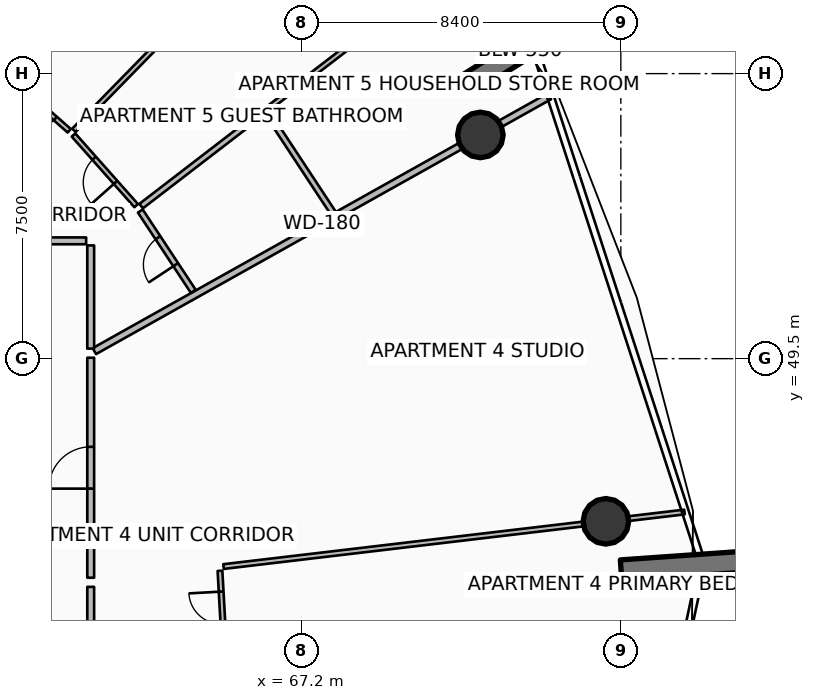
"""IFC4 building model, lengths in metres.
Left out: names, types, materials, properties, quantities, classifications, styles, units other than length and angle.
Written with IfcOpenShell. Run it as: python <this file> out.ifc"""

import sys

from ifc_helpers import new_model, si_unit, direction, frame, frame_2d, origin, origin_2d, place, context, subcontext, project, spatial, rectangle, circle, extrude, element, fill, save


model = new_model("IFC4")
c1 = context("Model", 3, precision=1e-05, world=origin(), true_north=direction((0.0, 1.0)))
c2 = subcontext(c1, "Body", "Model", "MODEL_VIEW")
j1 = project(units=[si_unit("LENGTHUNIT", "METRE"), si_unit("PLANEANGLEUNIT", "RADIAN")], contexts=[c1])
p1 = place(None, origin())
s1 = spatial("IfcSite", under=j1, at=p1, CompositionType="ELEMENT")
p2 = place(p1, origin())
s2 = spatial("IfcBuilding", under=s1, at=p2, CompositionType="ELEMENT")
p3 = place(p2, frame((0.0, 0.0, 82.65)))
s3 = spatial("IfcBuildingStorey", under=s2, at=p3, CompositionType="ELEMENT", Elevation=82.65)
for number, where, z_axis, x_axis in (
    (1, (71.469, 56.665, 0.0), (0.0, 0.0, 1.0), (0.848, 0.53, 0.0)),
    (2, (75.606, 43.93, 0.0), (0.0, 0.0, 1.0), (0.998, 0.07, 0.0)),
):
    element("IfcWall", number, at=place(p3, frame(where, z_axis=z_axis, x_axis=x_axis)), inside=s3, PredefinedType="SOLIDWALL", context=c2, shape_type="SweptSolid", body=[
        extrude(rectangle(XDim=3.5, YDim=0.55, at=frame_2d((1.75, 0.0))), origin(), (0.0, 0.0, 1.0), 3.75),
    ])
for number, where, z_axis, x_axis in (
    (3, (71.903, 55.386, 0.0), (0.0, 0.0, 1.0), (1.0, 0.0, 0.0)),
    (4, (75.207, 45.22, 0.0), (0.0, 0.0, 1.0), (1.0, 0.0, 0.0)),
):
    element("IfcColumn", number, at=place(p3, frame(where, z_axis=z_axis, x_axis=x_axis)), inside=s3, PredefinedType="COLUMN", context=c2, shape_type="SweptSolid", body=[
        extrude(circle(Radius=0.6, at=origin_2d()), origin(), (0.0, 0.0, 1.0), 3.5),
    ])
p4 = place(p3, frame((61.746, 49.698, 0.0), z_axis=(0.0, 0.0, 1.0), x_axis=(0.872489938668, 0.488632077256, 0.0)))
e5 = element("IfcWall", 5, at=p4, inside=s3, PredefinedType="PARTITIONING", context=c2, shape_type="SweptSolid", body=[
    extrude(rectangle(XDim=13.725, YDim=0.18, at=frame_2d((6.862, 0.0))), origin(), (0.0, 0.0, 1.0), 2.94),
])
p5 = place(p3, frame((61.65, 43.736, 0.0), z_axis=(0.0, 0.0, 1.0), x_axis=(0.0, 1.0, 0.0)))
e6 = element("IfcWall", 6, at=p5, inside=s3, PredefinedType="PARTITIONING", context=c2, shape_type="SweptSolid", body=[
    extrude(rectangle(XDim=5.789, YDim=0.18, at=frame_2d((2.895, 0.0))), origin(), (0.0, 0.0, 1.0), 2.94),
])
p6 = place(p5, frame((2.344, 0.0, 0.0)))
e7 = element("IfcOpeningElement", 7, at=p6, cuts=e6, PredefinedType="OPENING", context=c2, shape_type="SweptSolid", body=[
    extrude(rectangle(XDim=1.1, YDim=2.1, at=frame_2d((0.55, 1.05))), frame((0.0, 0.1, 0.0), z_axis=(0.0, -1.0, 0.0), x_axis=(1.0, 0.0, 0.0)), (0.0, 0.0, 1.0), 0.2),
])
p7 = place(p3, frame((61.65, 38.27, 0.0), z_axis=(0.0, 0.0, 1.0), x_axis=(0.0, 1.0, 0.0)))
e8 = element("IfcWall", 8, at=p7, inside=s3, PredefinedType="PARTITIONING", context=c2, shape_type="SweptSolid", body=[
    extrude(rectangle(XDim=5.225, YDim=0.18, at=frame_2d((2.613, 0.0))), origin(), (0.0, 0.0, 1.0), 2.94),
])
p8 = place(p3, frame((65.145, 44.029, 0.0), z_axis=(0.0, 0.0, 1.0), x_axis=(0.993069321468, 0.117530092994, 0.0)))
e9 = element("IfcWall", 9, at=p8, inside=s3, PredefinedType="PARTITIONING", context=c2, shape_type="SweptSolid", body=[
    extrude(rectangle(XDim=12.214, YDim=0.125, at=frame_2d((6.107, 0.0))), origin(), (0.0, 0.0, 1.0), 2.94),
])
p9 = place(p3, frame((65.16, 41.975, 0.0), z_axis=(0.0, 0.0, 1.0), x_axis=(-0.055845342743, 0.998439431159, 0.0)))
e10 = element("IfcWall", 10, at=p9, inside=s3, PredefinedType="PARTITIONING", context=c2, shape_type="SweptSolid", body=[
    extrude(rectangle(XDim=1.945, YDim=0.125, at=frame_2d((0.973, 0.0))), origin(), (0.0, 0.0, 1.0), 2.94),
])
p10 = place(p9, frame((0.548, 0.0, 0.0)))
e11 = element("IfcOpeningElement", 11, at=p10, cuts=e10, PredefinedType="OPENING", context=c2, shape_type="SweptSolid", body=[
    extrude(rectangle(XDim=0.85, YDim=2.06, at=frame_2d((0.425, 1.03))), frame((0.0, 0.073, 0.0), z_axis=(0.0, -1.0, 0.0), x_axis=(1.0, 0.0, 0.0)), (0.0, 0.0, 1.0), 0.145),
])
p11 = place(p3, frame((61.65, 49.764, 0.0), z_axis=(0.0, 0.0, 1.0), x_axis=(0.0, 1.0, 0.0)))
e12 = element("IfcWall", 12, at=p11, inside=s3, PredefinedType="PARTITIONING", context=c2, shape_type="SweptSolid", body=[
    extrude(rectangle(XDim=2.716, YDim=0.18, at=frame_2d((1.358, 0.0))), origin(), (0.0, 0.0, 1.0), 2.94),
])
p12 = place(p3, frame((61.53, 52.6, 0.0), z_axis=(0.0, 0.0, 1.0), x_axis=(-1.0, 0.0, 0.0)))
e13 = element("IfcWall", 13, at=p12, inside=s3, PredefinedType="PARTITIONING", context=c2, shape_type="SweptSolid", body=[
    extrude(rectangle(XDim=5.054, YDim=0.18, at=frame_2d((2.527, 0.0))), origin(), (0.0, 0.0, 1.0), 2.94),
])
p13 = place(p3, frame((59.702, 56.844, 0.0), z_axis=(0.0, 0.0, 1.0), x_axis=(0.619083405129, 0.785325243128, 0.0)))
e14 = element("IfcWall", 14, at=p13, inside=s3, PredefinedType="PARTITIONING", context=c2, shape_type="SweptSolid", body=[
    extrude(rectangle(XDim=9.769, YDim=0.125, at=frame_2d((4.885, 0.0))), origin(), (0.0, 0.0, 1.0), 2.94),
])
p14 = place(p3, frame((64.35, 51.271, 0.0), z_axis=(0.0, 0.0, 1.0), x_axis=(-0.550510405652, 0.83482830167, 0.0)))
e15 = element("IfcWall", 15, at=p14, inside=s3, PredefinedType="PARTITIONING", context=c2, shape_type="SweptSolid", body=[
    extrude(rectangle(XDim=2.532, YDim=0.15, at=frame_2d((1.266, 0.0))), origin(), (0.0, 0.0, 1.0), 2.94),
])
p15 = place(p14, frame((0.841, 0.0, 0.0)))
e16 = element("IfcOpeningElement", 16, at=p15, cuts=e15, PredefinedType="OPENING", context=c2, shape_type="SweptSolid", body=[
    extrude(rectangle(XDim=0.85, YDim=2.06, at=frame_2d((0.425, 1.03))), frame((0.0, 0.085, 0.0), z_axis=(0.0, -1.0, 0.0), x_axis=(1.0, 0.0, 0.0)), (0.0, 0.0, 1.0), 0.17),
])
p16 = place(p3, frame((68.031, 53.333, 0.0), z_axis=(0.0, 0.0, 1.0), x_axis=(-0.550480727927, 0.83484787128, 0.0)))
e17 = element("IfcWall", 17, at=p16, inside=s3, PredefinedType="PARTITIONING", context=c2, shape_type="SweptSolid", body=[
    extrude(rectangle(XDim=3.143, YDim=0.15, at=frame_2d((1.572, 0.0))), origin(), (0.0, 0.0, 1.0), 2.94),
])
p17 = place(p3, frame((62.978, 53.514, 0.0), z_axis=(0.0, 0.0, 1.0), x_axis=(0.792801485355, 0.609479946199, 0.0)))
e18 = element("IfcWall", 18, at=p17, inside=s3, PredefinedType="PARTITIONING", context=c2, shape_type="SweptSolid", body=[
    extrude(rectangle(XDim=4.09, YDim=0.15, at=frame_2d((2.045, 0.0))), origin(), (0.0, 0.0, 1.0), 2.94),
])
p18 = place(p3, frame((66.323, 56.086, 0.0), z_axis=(0.0, 0.0, 1.0), x_axis=(0.792792040596, 0.60949223159, 0.0)))
e19 = element("IfcWall", 19, at=p18, inside=s3, PredefinedType="PARTITIONING", context=c2, shape_type="SweptSolid", body=[
    extrude(rectangle(XDim=5.994, YDim=0.125, at=frame_2d((2.997, 0.0))), origin(), (0.0, 0.0, 1.0), 2.94),
])
p19 = place(p18, frame((2.572, 0.0, 0.0)))
e20 = element("IfcOpeningElement", 20, at=p19, cuts=e19, PredefinedType="OPENING", context=c2, shape_type="SweptSolid", body=[
    extrude(rectangle(XDim=0.85, YDim=2.06, at=frame_2d((0.425, 1.03))), frame((0.0, 0.073, 0.0), z_axis=(0.0, -1.0, 0.0), x_axis=(1.0, 0.0, 0.0)), (0.0, 0.0, 1.0), 0.145),
])
p20 = place(p3, frame((61.208, 55.508, 0.0), z_axis=(0.0, 0.0, 1.0), x_axis=(0.699096858951, 0.715026979774, 0.0)))
e21 = element("IfcWall", 21, at=p20, inside=s3, PredefinedType="PARTITIONING", context=c2, shape_type="SweptSolid", body=[
    extrude(rectangle(XDim=9.747, YDim=0.125, at=frame_2d((4.874, 0.0))), origin(), (0.0, 0.0, 1.0), 2.94),
])
p21 = place(p3, frame((62.846, 53.527, 0.0), z_axis=(0.0, 0.0, 1.0), x_axis=(-0.663881646848, 0.747837655497, 0.0)))
e22 = element("IfcWall", 22, at=p21, inside=s3, PredefinedType="PARTITIONING", context=c2, shape_type="SweptSolid", body=[
    extrude(rectangle(XDim=2.483, YDim=0.125, at=frame_2d((1.242, 0.0))), origin(), (0.0, 0.0, 1.0), 2.94),
])
p22 = place(p21, frame((0.817, 0.0, 0.0)))
e23 = element("IfcOpeningElement", 23, at=p22, cuts=e22, PredefinedType="OPENING", context=c2, shape_type="SweptSolid", body=[
    extrude(rectangle(XDim=0.85, YDim=2.06, at=frame_2d((0.425, 1.03))), frame((0.0, 0.073, 0.0), z_axis=(0.0, -1.0, 0.0), x_axis=(1.0, 0.0, 0.0)), (0.0, 0.0, 1.0), 0.145),
])
p23 = place(p3, frame((61.084, 55.497, 0.0), z_axis=(0.0, 0.0, 1.0), x_axis=(-0.75124742024, 0.660020691784, 0.0)))
e24 = element("IfcWall", 24, at=p23, inside=s3, PredefinedType="PARTITIONING", context=c2, shape_type="SweptSolid", body=[
    extrude(rectangle(XDim=1.823, YDim=0.125, at=frame_2d((0.911, 0.0))), origin(), (0.0, 0.0, 1.0), 2.94),
])
p24 = place(p23, frame((0.486, 0.0, 0.0)))
e25 = element("IfcOpeningElement", 25, at=p24, cuts=e24, PredefinedType="OPENING", context=c2, shape_type="SweptSolid", body=[
    extrude(rectangle(XDim=0.85, YDim=2.06, at=frame_2d((0.425, 1.03))), frame((0.0, 0.073, 0.0), z_axis=(0.0, -1.0, 0.0), x_axis=(1.0, 0.0, 0.0)), (0.0, 0.0, 1.0), 0.145),
])
p25 = place(p6, origin())
e26 = element("IfcDoor", 26, at=p25, inside=s3, OperationType="SINGLE_SWING_LEFT", PredefinedType="DOOR", context=c2, shape_type="SweptSolid", body=[
    extrude(rectangle(XDim=1.1, YDim=2.1, at=frame_2d((0.55, 1.05))), frame((0.0, 0.025, 0.0), z_axis=(0.0, -1.0, 0.0), x_axis=(1.0, 0.0, 0.0)), (0.0, 0.0, 1.0), 0.05),
])
fill(e7, e26)
p26 = place(p10, origin())
e27 = element("IfcDoor", 27, at=p26, inside=s3, OperationType="SINGLE_SWING_RIGHT", PredefinedType="DOOR", context=c2, shape_type="SweptSolid", body=[
    extrude(rectangle(XDim=0.85, YDim=2.06, at=frame_2d((0.425, 1.03))), frame((0.0, 0.025, 0.0), z_axis=(0.0, -1.0, 0.0), x_axis=(1.0, 0.0, 0.0)), (0.0, 0.0, 1.0), 0.05),
])
fill(e11, e27)
p27 = place(p15, origin())
e28 = element("IfcDoor", 28, at=p27, inside=s3, OperationType="SINGLE_SWING_LEFT", PredefinedType="DOOR", context=c2, shape_type="SweptSolid", body=[
    extrude(rectangle(XDim=0.85, YDim=2.06, at=frame_2d((0.425, 1.03))), frame((0.0, 0.025, 0.0), z_axis=(0.0, -1.0, 0.0), x_axis=(1.0, 0.0, 0.0)), (0.0, 0.0, 1.0), 0.05),
])
fill(e16, e28)
p28 = place(p22, origin())
e29 = element("IfcDoor", 29, at=p28, inside=s3, OperationType="SINGLE_SWING_LEFT", PredefinedType="DOOR", context=c2, shape_type="SweptSolid", body=[
    extrude(rectangle(XDim=0.85, YDim=2.06, at=frame_2d((0.425, 1.03))), frame((0.0, 0.025, 0.0), z_axis=(0.0, -1.0, 0.0), x_axis=(1.0, 0.0, 0.0)), (0.0, 0.0, 1.0), 0.05),
])
fill(e23, e29)
p29 = place(p24, origin())
e30 = element("IfcDoor", 30, at=p29, inside=s3, OperationType="SINGLE_SWING_RIGHT", PredefinedType="DOOR", context=c2, shape_type="SweptSolid", body=[
    extrude(rectangle(XDim=0.85, YDim=2.06, at=frame_2d((0.425, 1.03))), frame((0.0, 0.025, 0.0), z_axis=(0.0, -1.0, 0.0), x_axis=(1.0, 0.0, 0.0)), (0.0, 0.0, 1.0), 0.05),
])
fill(e25, e30)
save(model, sys.argv[1])
